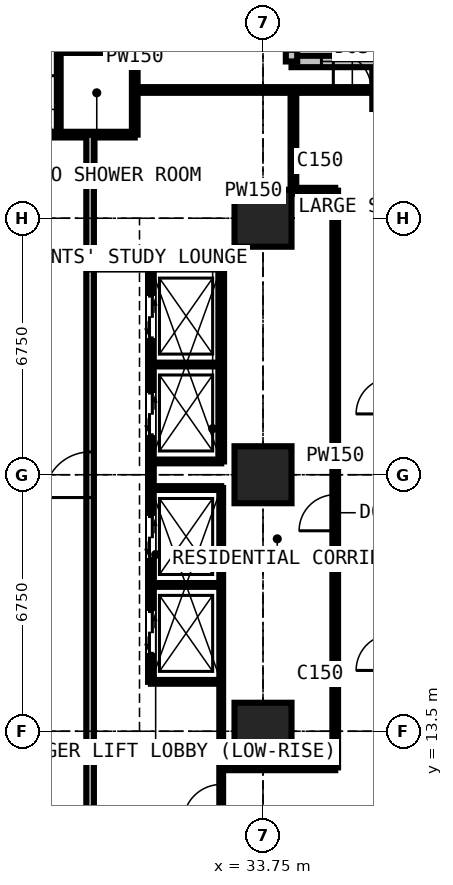
"""IFC4 building model, lengths in metres.
Left out: names, types, materials, properties, quantities, classifications, styles, units other than length and angle.
Written with IfcOpenShell. Run it as: python <this file> out.ifc"""

import sys

from ifc_helpers import new_model, si_unit, direction, frame, frame_2d, origin, origin_2d, place, context, subcontext, project, spatial, rectangle, extrude, element, fill, save


model = new_model("IFC4")
c1 = context("Model", 3, precision=1e-05, world=origin(), true_north=direction((0.0, 1.0)))
c2 = subcontext(c1, "Body", "Model", "MODEL_VIEW")
j1 = project(units=[si_unit("LENGTHUNIT", "METRE"), si_unit("PLANEANGLEUNIT", "RADIAN")], contexts=[c1])
p1 = place(None, origin())
s1 = spatial("IfcSite", under=j1, at=p1, CompositionType="ELEMENT")
p2 = place(p1, origin())
s2 = spatial("IfcBuilding", under=s1, at=p2, CompositionType="ELEMENT")
p3 = place(p2, frame((0.0, 0.0, 119.7)))
s3 = spatial("IfcBuildingStorey", under=s2, at=p3, CompositionType="ELEMENT", Elevation=119.7)
for number, where, z_axis, x_axis in (
    (1, (33.75, 13.5, 0.0), (0.0, 0.0, 1.0), (1.0, 0.0, 0.0)),
    (2, (33.75, 20.25, 0.0), (0.0, 0.0, 1.0), (1.0, 0.0, 0.0)),
    (3, (33.75, 27.0, 0.0), (0.0, 0.0, 1.0), (1.0, 0.0, 0.0)),
):
    element("IfcColumn", number, at=place(p3, frame(where, z_axis=z_axis, x_axis=x_axis)), inside=s3, PredefinedType="COLUMN", context=c2, shape_type="SweptSolid", body=[
        extrude(rectangle(XDim=1.5, YDim=1.5, at=origin_2d()), origin(), (0.0, 0.0, 1.0), 3.6),
    ])
p4 = place(p3, frame((37.125, 30.375, 0.0), z_axis=(0.0, 0.0, 1.0), x_axis=(1.0, 0.0, 0.0)))
e4 = element("IfcColumn", 4, at=p4, inside=s3, PredefinedType="COLUMN", context=c2, shape_type="SweptSolid", body=[
    extrude(rectangle(XDim=1.0, YDim=1.0, at=origin_2d()), origin(), (0.0, 0.0, 1.0), 3.6),
])
p5 = place(p3, frame((37.875, 31.125, 0.0), z_axis=(0.0, 0.0, 1.0), x_axis=(-1.0, 0.0, 0.0)))
e5 = element("IfcWall", 5, at=p5, inside=s3, PredefinedType="SOLIDWALL", context=c2, shape_type="SweptSolid", body=[
    extrude(rectangle(XDim=3.375, YDim=0.3, at=frame_2d((1.688, 0.0))), origin(), (0.0, 0.0, 1.0), 3.375),
])
p6 = place(p5, frame((0.788, 0.0, 0.6)))
e6 = element("IfcOpeningElement", 6, at=p6, cuts=e5, PredefinedType="OPENING", context=c2, shape_type="SweptSolid", body=[
    extrude(rectangle(XDim=1.8, YDim=2.1, at=frame_2d((0.9, 1.05))), frame((0.0, 0.16, 0.0), z_axis=(0.0, -1.0, 0.0), x_axis=(1.0, 0.0, 0.0)), (0.0, 0.0, 1.0), 0.32),
])
p7 = place(p3, frame((34.5, 31.125, 0.0), z_axis=(0.0, 0.0, 1.0), x_axis=(0.0, 1.0, 0.0)))
e7 = element("IfcWall", 7, at=p7, inside=s3, PredefinedType="SOLIDWALL", context=c2, shape_type="SweptSolid", body=[
    extrude(rectangle(XDim=3.375, YDim=0.3, at=frame_2d((1.688, 0.0))), origin(), (0.0, 0.0, 1.0), 3.375),
])
p8 = place(p7, frame((0.268, 0.0, 0.9)))
e8 = element("IfcOpeningElement", 8, at=p8, cuts=e7, PredefinedType="OPENING", context=c2, shape_type="SweptSolid", body=[
    extrude(rectangle(XDim=1.5, YDim=1.8, at=frame_2d((0.75, 0.9))), frame((0.0, 0.16, 0.0), z_axis=(0.0, -1.0, 0.0), x_axis=(1.0, 0.0, 0.0)), (0.0, 0.0, 1.0), 0.32),
])
p9 = place(p3, frame((11.3, 29.2, 0.0), z_axis=(0.0, 0.0, 1.0), x_axis=(1.0, 0.0, 0.0)))
e9 = element("IfcWall", 9, at=p9, inside=s3, PredefinedType="PARTITIONING", context=c2, shape_type="SweptSolid", body=[
    extrude(rectangle(XDim=19.075, YDim=0.15, at=frame_2d((9.538, 0.0))), origin(), (0.0, 0.0, 1.0), 3.375),
])
p10 = place(p9, frame((5.825, 0.0, 0.0)))
e10 = element("IfcOpeningElement", 10, at=p10, cuts=e9, PredefinedType="OPENING", context=c2, shape_type="SweptSolid", body=[
    extrude(rectangle(XDim=0.95, YDim=2.2, at=frame_2d((0.475, 1.1))), frame((0.0, 0.085, 0.0), z_axis=(0.0, -1.0, 0.0), x_axis=(1.0, 0.0, 0.0)), (0.0, 0.0, 1.0), 0.17),
])
p11 = place(p9, frame((9.2, 0.0, 0.0)))
e11 = element("IfcOpeningElement", 11, at=p11, cuts=e9, PredefinedType="OPENING", context=c2, shape_type="SweptSolid", body=[
    extrude(rectangle(XDim=0.95, YDim=2.2, at=frame_2d((0.475, 1.1))), frame((0.0, 0.085, 0.0), z_axis=(0.0, -1.0, 0.0), x_axis=(1.0, 0.0, 0.0)), (0.0, 0.0, 1.0), 0.17),
])
p12 = place(p9, frame((12.575, 0.0, 0.0)))
e12 = element("IfcOpeningElement", 12, at=p12, cuts=e9, PredefinedType="OPENING", context=c2, shape_type="SweptSolid", body=[
    extrude(rectangle(XDim=0.95, YDim=2.2, at=frame_2d((0.475, 1.1))), frame((0.0, 0.085, 0.0), z_axis=(0.0, -1.0, 0.0), x_axis=(1.0, 0.0, 0.0)), (0.0, 0.0, 1.0), 0.17),
])
p13 = place(p9, frame((15.95, 0.0, 0.0)))
e13 = element("IfcOpeningElement", 13, at=p13, cuts=e9, PredefinedType="OPENING", context=c2, shape_type="SweptSolid", body=[
    extrude(rectangle(XDim=0.95, YDim=2.2, at=frame_2d((0.475, 1.1))), frame((0.0, 0.085, 0.0), z_axis=(0.0, -1.0, 0.0), x_axis=(1.0, 0.0, 0.0)), (0.0, 0.0, 1.0), 0.17),
])
p14 = place(p9, frame((0.6, 0.0, 0.0)))
e14 = element("IfcOpeningElement", 14, at=p14, cuts=e9, PredefinedType="OPENING", context=c2, shape_type="SweptSolid", body=[
    extrude(rectangle(XDim=1.0, YDim=2.2, at=frame_2d((0.5, 1.1))), frame((0.0, 0.085, 0.0), z_axis=(0.0, -1.0, 0.0), x_axis=(1.0, 0.0, 0.0)), (0.0, 0.0, 1.0), 0.17),
])
p15 = place(p3, frame((28.375, 29.2, 0.0), z_axis=(0.0, 0.0, 1.0), x_axis=(0.0, 1.0, 0.0)))
e15 = element("IfcWall", 15, at=p15, inside=s3, PredefinedType="PARTITIONING", context=c2, shape_type="SweptSolid", body=[
    extrude(rectangle(XDim=2.2, YDim=0.1, at=frame_2d((1.1, 0.0))), origin(), (0.0, 0.0, 1.0), 3.375),
])
p16 = place(p15, frame((0.65, 0.0, 0.0)))
e16 = element("IfcOpeningElement", 16, at=p16, cuts=e15, PredefinedType="OPENING", context=c2, shape_type="SweptSolid", body=[
    extrude(rectangle(XDim=0.9, YDim=2.2, at=frame_2d((0.45, 1.1))), frame((0.0, 0.06, 0.0), z_axis=(0.0, -1.0, 0.0), x_axis=(1.0, 0.0, 0.0)), (0.0, 0.0, 1.0), 0.12),
])
p17 = place(p3, frame((28.375, 31.4, 0.0), z_axis=(0.0, 0.0, 1.0), x_axis=(1.0, 0.0, 0.0)))
e17 = element("IfcWall", 17, at=p17, inside=s3, PredefinedType="PARTITIONING", context=c2, shape_type="SweptSolid", body=[
    extrude(rectangle(XDim=2.0, YDim=0.1, at=frame_2d((1.0, 0.0))), origin(), (0.0, 0.0, 1.0), 3.375),
])
p18 = place(p3, frame((29.2, 11.3, 0.0), z_axis=(0.0, 0.0, 1.0), x_axis=(0.0, 1.0, 0.0)))
e18 = element("IfcWall", 18, at=p18, inside=s3, PredefinedType="PARTITIONING", context=c2, shape_type="SweptSolid", body=[
    extrude(rectangle(XDim=17.9, YDim=0.2, at=frame_2d((8.95, 0.0))), origin(), (0.0, 0.0, 1.0), 3.375),
])
p19 = place(p18, frame((8.35, 0.0, 0.0)))
e19 = element("IfcOpeningElement", 19, at=p19, cuts=e18, PredefinedType="OPENING", context=c2, shape_type="SweptSolid", body=[
    extrude(rectangle(XDim=1.2, YDim=2.2, at=frame_2d((0.6, 1.1))), frame((0.0, 0.11, 0.0), z_axis=(0.0, -1.0, 0.0), x_axis=(1.0, 0.0, 0.0)), (0.0, 0.0, 1.0), 0.22),
])
p20 = place(p3, frame((29.2, 25.7, 0.0), z_axis=(0.0, 0.0, 1.0), x_axis=(1.0, 0.0, 0.0)))
e20 = element("IfcWall", 20, at=p20, inside=s3, PredefinedType="SHEAR", context=c2, shape_type="SweptSolid", body=[
    extrude(rectangle(XDim=3.45, YDim=0.1, at=frame_2d((1.725, 0.0))), origin(), (0.0, 0.0, 1.0), 3.375),
])
p21 = place(p3, frame((30.375, 29.2, 0.0), z_axis=(0.0, 0.0, 1.0), x_axis=(0.0, 1.0, 0.0)))
e21 = element("IfcWall", 21, at=p21, inside=s3, PredefinedType="PARTITIONING", context=c2, shape_type="SweptSolid", body=[
    extrude(rectangle(XDim=5.284, YDim=0.15, at=frame_2d((2.642, 0.0))), origin(), (0.0, 0.0, 1.0), 3.375),
])
p22 = place(p3, frame((30.375, 30.375, 0.0), z_axis=(0.0, 0.0, 1.0), x_axis=(1.0, 0.0, 0.0)))
e22 = element("IfcWall", 22, at=p22, inside=s3, PredefinedType="PARTITIONING", context=c2, shape_type="SweptSolid", body=[
    extrude(rectangle(XDim=7.35, YDim=0.15, at=frame_2d((3.675, 0.0))), origin(), (0.0, 0.0, 1.0), 2.877),
])
p23 = place(p22, frame((5.225, 0.0, 0.0)))
e23 = element("IfcOpeningElement", 23, at=p23, cuts=e22, PredefinedType="OPENING", context=c2, shape_type="SweptSolid", body=[
    extrude(rectangle(XDim=1.0, YDim=2.2, at=frame_2d((0.5, 1.1))), frame((0.0, 0.085, 0.0), z_axis=(0.0, -1.0, 0.0), x_axis=(1.0, 0.0, 0.0)), (0.0, 0.0, 1.0), 0.17),
])
p24 = place(p3, frame((30.8, 14.8, 0.0), z_axis=(0.0, 0.0, 1.0), x_axis=(0.0, 1.0, 0.0)))
e24 = element("IfcWall", 24, at=p24, inside=s3, PredefinedType="PARTITIONING", context=c2, shape_type="SweptSolid", body=[
    extrude(rectangle(XDim=10.9, YDim=0.15, at=frame_2d((5.45, 0.0))), origin(), (0.0, 0.0, 1.0), 3.375),
])
p25 = place(p24, frame((0.75, 0.0, 0.0)))
e25 = element("IfcOpeningElement", 25, at=p25, cuts=e24, PredefinedType="OPENING", context=c2, shape_type="SweptSolid", body=[
    extrude(rectangle(XDim=1.1, YDim=2.2, at=frame_2d((0.55, 1.1))), frame((0.0, 0.085, 0.0), z_axis=(0.0, -1.0, 0.0), x_axis=(1.0, 0.0, 0.0)), (0.0, 0.0, 1.0), 0.17),
])
p26 = place(p24, frame((3.25, 0.0, 0.0)))
e26 = element("IfcOpeningElement", 26, at=p26, cuts=e24, PredefinedType="OPENING", context=c2, shape_type="SweptSolid", body=[
    extrude(rectangle(XDim=1.1, YDim=2.2, at=frame_2d((0.55, 1.1))), frame((0.0, 0.085, 0.0), z_axis=(0.0, -1.0, 0.0), x_axis=(1.0, 0.0, 0.0)), (0.0, 0.0, 1.0), 0.17),
])
p27 = place(p24, frame((6.5, 0.0, 0.0)))
e27 = element("IfcOpeningElement", 27, at=p27, cuts=e24, PredefinedType="OPENING", context=c2, shape_type="SweptSolid", body=[
    extrude(rectangle(XDim=1.1, YDim=2.2, at=frame_2d((0.55, 1.1))), frame((0.0, 0.085, 0.0), z_axis=(0.0, -1.0, 0.0), x_axis=(1.0, 0.0, 0.0)), (0.0, 0.0, 1.0), 0.17),
])
p28 = place(p24, frame((9.05, 0.0, 0.0)))
e28 = element("IfcOpeningElement", 28, at=p28, cuts=e24, PredefinedType="OPENING", context=c2, shape_type="SweptSolid", body=[
    extrude(rectangle(XDim=1.1, YDim=2.2, at=frame_2d((0.55, 1.1))), frame((0.0, 0.085, 0.0), z_axis=(0.0, -1.0, 0.0), x_axis=(1.0, 0.0, 0.0)), (0.0, 0.0, 1.0), 0.17),
])
for number, where, z_axis, x_axis in (
    (29, (30.8, 14.8, 0.0), (0.0, 0.0, 1.0), (1.0, 0.0, 0.0)),
    (30, (30.8, 17.35, 0.0), (0.0, 0.0, 1.0), (1.0, 0.0, 0.0)),
    (31, (30.8, 19.9, 0.0), (0.0, 0.0, 1.0), (1.0, 0.0, 0.0)),
    (32, (30.8, 20.6, 0.0), (0.0, 0.0, 1.0), (1.0, 0.0, 0.0)),
    (33, (30.8, 23.15, 0.0), (0.0, 0.0, 1.0), (1.0, 0.0, 0.0)),
):
    element("IfcWall", number, at=place(p3, frame(where, z_axis=z_axis, x_axis=x_axis)), inside=s3, PredefinedType="SHEAR", context=c2, shape_type="SweptSolid", body=[
        extrude(rectangle(XDim=1.85, YDim=0.1, at=frame_2d((0.925, 0.0))), origin(), (0.0, 0.0, 1.0), 3.375),
    ])
p29 = place(p3, frame((32.65, 10.6, 0.0), z_axis=(0.0, 0.0, 1.0), x_axis=(0.0, 1.0, 0.0)))
e34 = element("IfcWall", 34, at=p29, inside=s3, PredefinedType="SHEAR", context=c2, shape_type="SweptSolid", body=[
    extrude(rectangle(XDim=9.3, YDim=0.1, at=frame_2d((4.65, 0.0))), origin(), (0.0, 0.0, 1.0), 3.375),
])
p30 = place(p29, frame((0.5, 0.0, 0.0)))
e35 = element("IfcOpeningElement", 35, at=p30, cuts=e34, PredefinedType="OPENING", context=c2, shape_type="SweptSolid", body=[
    extrude(rectangle(XDim=1.0, YDim=2.2, at=frame_2d((0.5, 1.1))), frame((0.0, 0.06, 0.0), z_axis=(0.0, -1.0, 0.0), x_axis=(1.0, 0.0, 0.0)), (0.0, 0.0, 1.0), 0.12),
])
p31 = place(p3, frame((32.65, 12.55, 0.0), z_axis=(0.0, 0.0, 1.0), x_axis=(1.0, 0.0, 0.0)))
e36 = element("IfcWall", 36, at=p31, inside=s3, PredefinedType="PARTITIONING", context=c2, shape_type="SweptSolid", body=[
    extrude(rectangle(XDim=3.0, YDim=0.15, at=frame_2d((1.5, 0.0))), origin(), (0.0, 0.0, 1.0), 3.375),
])
p32 = place(p3, frame((32.65, 20.6, 0.0), z_axis=(0.0, 0.0, 1.0), x_axis=(0.0, 1.0, 0.0)))
e37 = element("IfcWall", 37, at=p32, inside=s3, PredefinedType="PARTITIONING", context=c2, shape_type="SweptSolid", body=[
    extrude(rectangle(XDim=5.1, YDim=0.15, at=frame_2d((2.55, 0.0))), origin(), (0.0, 0.0, 1.0), 3.375),
])
p33 = place(p3, frame((34.55, 27.725, 0.0), z_axis=(0.0, 0.0, 1.0), x_axis=(0.0, 1.0, 0.0)))
e38 = element("IfcWall", 38, at=p33, inside=s3, PredefinedType="PARTITIONING", context=c2, shape_type="SweptSolid", body=[
    extrude(rectangle(XDim=2.65, YDim=0.15, at=frame_2d((1.325, 0.0))), origin(), (0.0, 0.0, 1.0), 3.375),
])
p34 = place(p3, frame((34.55, 27.725, 0.0), z_axis=(0.0, 0.0, 1.0), x_axis=(1.0, 0.0, 0.0)))
e39 = element("IfcWall", 39, at=p34, inside=s3, PredefinedType="PARTITIONING", context=c2, shape_type="SweptSolid", body=[
    extrude(rectangle(XDim=1.1, YDim=0.15, at=frame_2d((0.55, 0.0))), origin(), (0.0, 0.0, 1.0), 3.375),
])
p35 = place(p3, frame((35.65, 12.55, 0.0), z_axis=(0.0, 0.0, 1.0), x_axis=(0.0, 1.0, 0.0)))
e40 = element("IfcWall", 40, at=p35, inside=s3, PredefinedType="PARTITIONING", context=c2, shape_type="SweptSolid", body=[
    extrude(rectangle(XDim=15.175, YDim=0.15, at=frame_2d((7.587, 0.0))), origin(), (0.0, 0.0, 1.0), 3.375),
])
p36 = place(p35, frame((6.225, 0.0, 0.0)))
e41 = element("IfcOpeningElement", 41, at=p36, cuts=e40, PredefinedType="OPENING", context=c2, shape_type="SweptSolid", body=[
    extrude(rectangle(XDim=0.95, YDim=2.2, at=frame_2d((0.475, 1.1))), frame((0.0, 0.085, 0.0), z_axis=(0.0, -1.0, 0.0), x_axis=(1.0, 0.0, 0.0)), (0.0, 0.0, 1.0), 0.17),
])
p37 = place(p6, origin())
e42 = element("IfcWindow", 42, at=p37, inside=s3, PartitioningType="SINGLE_PANEL", PredefinedType="WINDOW", context=c2, shape_type="SweptSolid", body=[
    extrude(rectangle(XDim=1.8, YDim=2.1, at=frame_2d((0.9, 1.05))), frame((0.0, 0.03, 0.0), z_axis=(0.0, -1.0, 0.0), x_axis=(1.0, 0.0, 0.0)), (0.0, 0.0, 1.0), 0.06),
])
fill(e6, e42)
p38 = place(p30, origin())
e43 = element("IfcDoor", 43, at=p38, inside=s3, OperationType="SINGLE_SWING_LEFT", PredefinedType="DOOR", context=c2, shape_type="SweptSolid", body=[
    extrude(rectangle(XDim=1.0, YDim=2.2, at=frame_2d((0.5, 1.1))), frame((0.0, 0.025, 0.0), z_axis=(0.0, -1.0, 0.0), x_axis=(1.0, 0.0, 0.0)), (0.0, 0.0, 1.0), 0.05),
])
fill(e35, e43)
p39 = place(p36, origin())
e44 = element("IfcDoor", 44, at=p39, inside=s3, OperationType="SINGLE_SWING_LEFT", PredefinedType="DOOR", context=c2, shape_type="SweptSolid", body=[
    extrude(rectangle(XDim=0.95, YDim=2.2, at=frame_2d((0.475, 1.1))), frame((0.0, 0.025, 0.0), z_axis=(0.0, -1.0, 0.0), x_axis=(1.0, 0.0, 0.0)), (0.0, 0.0, 1.0), 0.05),
])
fill(e41, e44)
p40 = place(p23, origin())
e45 = element("IfcDoor", 45, at=p40, inside=s3, OperationType="SINGLE_SWING_LEFT", PredefinedType="DOOR", context=c2, shape_type="SweptSolid", body=[
    extrude(rectangle(XDim=1.0, YDim=2.2, at=frame_2d((0.5, 1.1))), frame((0.0, 0.025, 0.0), z_axis=(0.0, -1.0, 0.0), x_axis=(1.0, 0.0, 0.0)), (0.0, 0.0, 1.0), 0.05),
])
fill(e23, e45)
p41 = place(p13, origin())
e46 = element("IfcDoor", 46, at=p41, inside=s3, OperationType="SINGLE_SWING_LEFT", PredefinedType="DOOR", context=c2, shape_type="SweptSolid", body=[
    extrude(rectangle(XDim=0.95, YDim=2.2, at=frame_2d((0.475, 1.1))), frame((0.0, 0.025, 0.0), z_axis=(0.0, -1.0, 0.0), x_axis=(1.0, 0.0, 0.0)), (0.0, 0.0, 1.0), 0.05),
])
fill(e13, e46)
p42 = place(p16, origin())
e47 = element("IfcDoor", 47, at=p42, inside=s3, OperationType="SINGLE_SWING_RIGHT", PredefinedType="DOOR", context=c2, shape_type="SweptSolid", body=[
    extrude(rectangle(XDim=0.9, YDim=2.2, at=frame_2d((0.45, 1.1))), frame((0.0, 0.025, 0.0), z_axis=(0.0, -1.0, 0.0), x_axis=(1.0, 0.0, 0.0)), (0.0, 0.0, 1.0), 0.05),
])
fill(e16, e47)
p43 = place(p25, origin())
e48 = element("IfcDoor", 48, at=p43, inside=s3, OperationType="DOUBLE_DOOR_SLIDING", PredefinedType="DOOR", context=c2, shape_type="SweptSolid", body=[
    extrude(rectangle(XDim=1.1, YDim=2.2, at=frame_2d((0.55, 1.1))), frame((0.0, 0.025, 0.0), z_axis=(0.0, -1.0, 0.0), x_axis=(1.0, 0.0, 0.0)), (0.0, 0.0, 1.0), 0.05),
])
fill(e25, e48)
p44 = place(p26, origin())
e49 = element("IfcDoor", 49, at=p44, inside=s3, OperationType="DOUBLE_DOOR_SLIDING", PredefinedType="DOOR", context=c2, shape_type="SweptSolid", body=[
    extrude(rectangle(XDim=1.1, YDim=2.2, at=frame_2d((0.55, 1.1))), frame((0.0, 0.025, 0.0), z_axis=(0.0, -1.0, 0.0), x_axis=(1.0, 0.0, 0.0)), (0.0, 0.0, 1.0), 0.05),
])
fill(e26, e49)
p45 = place(p27, origin())
e50 = element("IfcDoor", 50, at=p45, inside=s3, OperationType="DOUBLE_DOOR_SLIDING", PredefinedType="DOOR", context=c2, shape_type="SweptSolid", body=[
    extrude(rectangle(XDim=1.1, YDim=2.2, at=frame_2d((0.55, 1.1))), frame((0.0, 0.025, 0.0), z_axis=(0.0, -1.0, 0.0), x_axis=(1.0, 0.0, 0.0)), (0.0, 0.0, 1.0), 0.05),
])
fill(e27, e50)
p46 = place(p28, origin())
e51 = element("IfcDoor", 51, at=p46, inside=s3, OperationType="DOUBLE_DOOR_SLIDING", PredefinedType="DOOR", context=c2, shape_type="SweptSolid", body=[
    extrude(rectangle(XDim=1.1, YDim=2.2, at=frame_2d((0.55, 1.1))), frame((0.0, 0.025, 0.0), z_axis=(0.0, -1.0, 0.0), x_axis=(1.0, 0.0, 0.0)), (0.0, 0.0, 1.0), 0.05),
])
fill(e28, e51)
p47 = place(p19, origin())
e52 = element("IfcDoor", 52, at=p47, inside=s3, OperationType="DOUBLE_DOOR_SINGLE_SWING", PredefinedType="DOOR", context=c2, shape_type="SweptSolid", body=[
    extrude(rectangle(XDim=1.2, YDim=2.2, at=frame_2d((0.6, 1.1))), frame((0.0, 0.025, 0.0), z_axis=(0.0, -1.0, 0.0), x_axis=(1.0, 0.0, 0.0)), (0.0, 0.0, 1.0), 0.05),
])
fill(e19, e52)
save(model, sys.argv[1])
